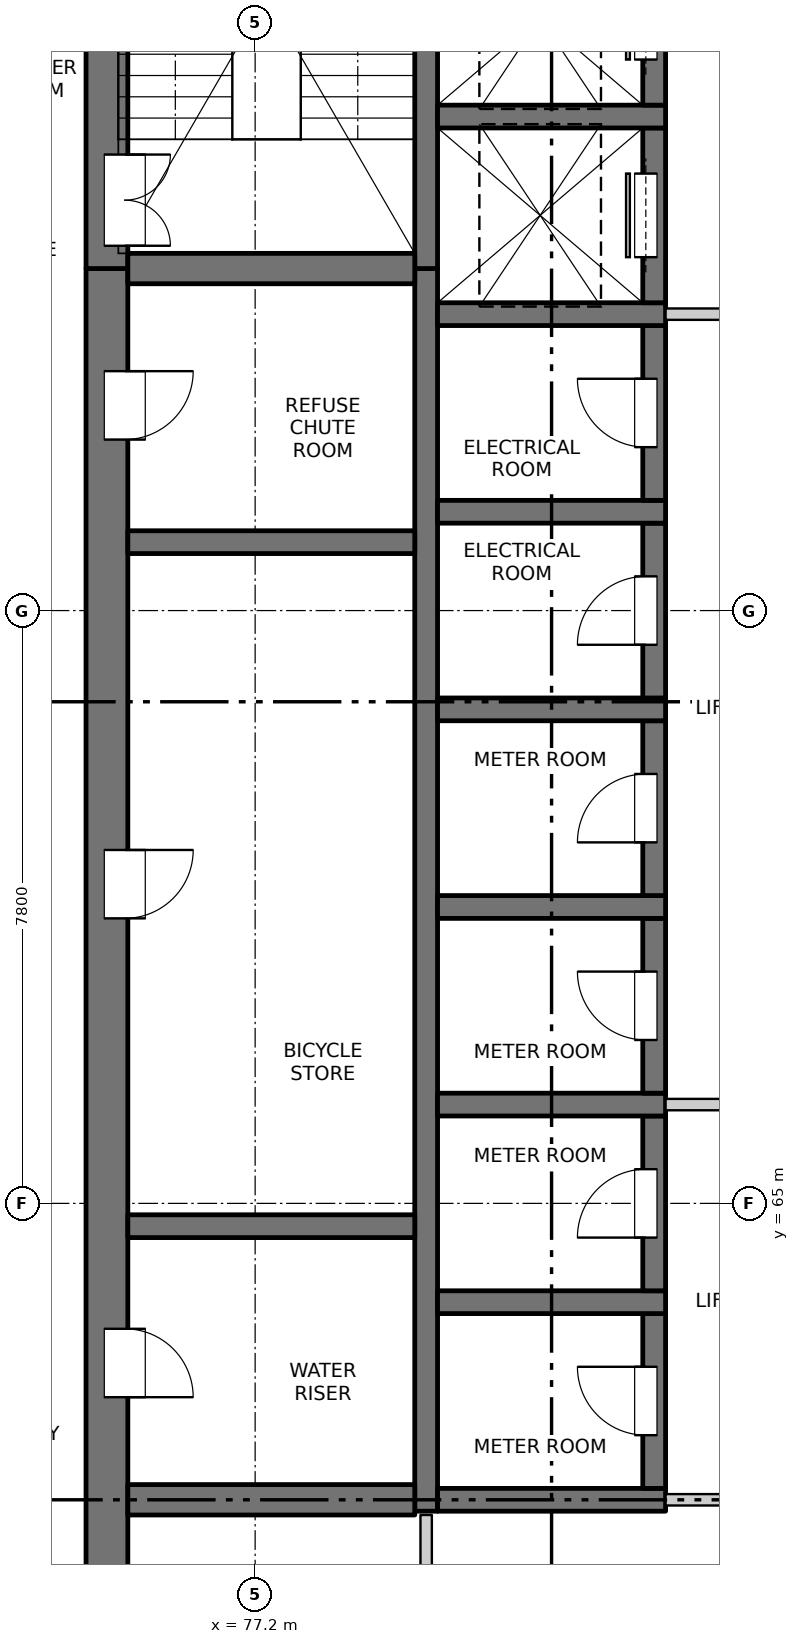
"""IFC4 building model, lengths in metres.
Left out: names, types, materials, properties, quantities, classifications, styles, units other than length and angle.
Written with IfcOpenShell. Run it as: python <this file> out.ifc"""

import sys

from ifc_helpers import new_model, si_unit, direction, frame, frame_2d, origin, place, context, subcontext, project, spatial, rectangle, extrude, element, fill, save


model = new_model("IFC4")
c1 = context("Model", 3, precision=1e-05, world=origin(), true_north=direction((0.0, 1.0)))
c2 = subcontext(c1, "Body", "Model", "MODEL_VIEW")
j1 = project(units=[si_unit("LENGTHUNIT", "METRE"), si_unit("PLANEANGLEUNIT", "RADIAN")], contexts=[c1])
p1 = place(None, origin())
s1 = spatial("IfcSite", under=j1, at=p1, CompositionType="ELEMENT")
p2 = place(p1, origin())
s2 = spatial("IfcBuilding", under=s1, at=p2, CompositionType="ELEMENT")
p3 = place(p2, frame((0.0, 0.0, 148.6)))
s3 = spatial("IfcBuildingStorey", under=s2, at=p3, CompositionType="ELEMENT", Elevation=148.6)
p4 = place(p3, frame((75.25, 54.975, -0.3), z_axis=(0.0, 0.0, 1.0), x_axis=(0.0, 1.0, 0.0)))
e1 = element("IfcWall", 1, at=p4, inside=s3, PredefinedType="SOLIDWALL", context=c2, shape_type="SweptSolid", body=[
    extrude(rectangle(XDim=22.325, YDim=0.55, at=frame_2d((11.163, 0.0))), origin(), (0.0, 0.0, 1.0), 3.45),
])
p5 = place(p4, frame((7.475, 0.0, 0.3)))
e2 = element("IfcOpeningElement", 2, at=p5, cuts=e1, PredefinedType="OPENING", context=c2, shape_type="SweptSolid", body=[
    extrude(rectangle(XDim=0.9, YDim=2.1, at=frame_2d((0.45, 1.05))), frame((0.0, 0.285, 0.0), z_axis=(0.0, -1.0, 0.0), x_axis=(1.0, 0.0, 0.0)), (0.0, 0.0, 1.0), 0.57),
])
p6 = place(p4, frame((13.775, 0.0, 0.3)))
e3 = element("IfcOpeningElement", 3, at=p6, cuts=e1, PredefinedType="OPENING", context=c2, shape_type="SweptSolid", body=[
    extrude(rectangle(XDim=0.9, YDim=2.1, at=frame_2d((0.45, 1.05))), frame((0.0, 0.285, 0.0), z_axis=(0.0, -1.0, 0.0), x_axis=(1.0, 0.0, 0.0)), (0.0, 0.0, 1.0), 0.57),
])
p7 = place(p4, frame((20.075, 0.0, 0.3)))
e4 = element("IfcOpeningElement", 4, at=p7, cuts=e1, PredefinedType="OPENING", context=c2, shape_type="SweptSolid", body=[
    extrude(rectangle(XDim=0.9, YDim=2.1, at=frame_2d((0.45, 1.05))), frame((0.0, 0.285, 0.0), z_axis=(0.0, -1.0, 0.0), x_axis=(1.0, 0.0, 0.0)), (0.0, 0.0, 1.0), 0.57),
])
p8 = place(p3, frame((75.25, 77.3, -0.3), z_axis=(0.0, 0.0, 1.0), x_axis=(0.0, 1.0, 0.0)))
e5 = element("IfcWall", 5, at=p8, inside=s3, PredefinedType="SOLIDWALL", context=c2, shape_type="SweptSolid", body=[
    extrude(rectangle(XDim=7.475, YDim=0.55, at=frame_2d((3.737, 0.0))), origin(), (0.0, 0.0, 1.0), 3.45),
])
p9 = place(p8, frame((0.3, 0.0, 0.3)))
e6 = element("IfcOpeningElement", 6, at=p9, cuts=e5, PredefinedType="OPENING", context=c2, shape_type="SweptSolid", body=[
    extrude(rectangle(XDim=1.2, YDim=2.1, at=frame_2d((0.6, 1.05))), frame((0.0, 0.285, 0.0), z_axis=(0.0, -1.0, 0.0), x_axis=(1.0, 0.0, 0.0)), (0.0, 0.0, 1.0), 0.57),
])
p10 = place(p3, frame((79.45, 60.95, -0.3), z_axis=(0.0, 0.0, 1.0), x_axis=(0.0, 1.0, 0.0)))
e7 = element("IfcWall", 7, at=p10, inside=s3, PredefinedType="SOLIDWALL", context=c2, shape_type="SweptSolid", body=[
    extrude(rectangle(XDim=16.35, YDim=0.3, at=frame_2d((8.175, 0.0))), origin(), (0.0, 0.0, 1.0), 3.45),
])
p11 = place(p3, frame((79.45, 77.3, -0.3), z_axis=(0.0, 0.0, 1.0), x_axis=(0.0, 1.0, 0.0)))
e8 = element("IfcWall", 8, at=p11, inside=s3, PredefinedType="SOLIDWALL", context=c2, shape_type="SweptSolid", body=[
    extrude(rectangle(XDim=6.925, YDim=0.3, at=frame_2d((3.462, 0.0))), origin(), (0.0, 0.0, 1.0), 3.45),
])
p12 = place(p3, frame((79.6, 61.1, -0.3), z_axis=(0.0, 0.0, 1.0), x_axis=(1.0, 0.0, 0.0)))
e9 = element("IfcWall", 9, at=p12, inside=s3, PredefinedType="SOLIDWALL", context=c2, shape_type="SweptSolid", body=[
    extrude(rectangle(XDim=3.0, YDim=0.3, at=frame_2d((1.5, 0.0))), origin(), (0.0, 0.0, 1.0), 3.45),
])
p13 = place(p3, frame((82.45, 61.25, -0.3), z_axis=(0.0, 0.0, 1.0), x_axis=(0.0, 1.0, 0.0)))
e10 = element("IfcWall", 10, at=p13, inside=s3, PredefinedType="SOLIDWALL", context=c2, shape_type="SweptSolid", body=[
    extrude(rectangle(XDim=2.3, YDim=0.3, at=frame_2d((1.15, 0.0))), origin(), (0.0, 0.0, 1.0), 3.45),
])
p14 = place(p13, frame((0.7, 0.0, 0.3)))
e11 = element("IfcOpeningElement", 11, at=p14, cuts=e10, PredefinedType="OPENING", context=c2, shape_type="SweptSolid", body=[
    extrude(rectangle(XDim=0.9, YDim=2.1, at=frame_2d((0.45, 1.05))), frame((0.0, 0.16, 0.0), z_axis=(0.0, -1.0, 0.0), x_axis=(1.0, 0.0, 0.0)), (0.0, 0.0, 1.0), 0.32),
])
p15 = place(p3, frame((79.6, 63.7, -0.3), z_axis=(0.0, 0.0, 1.0), x_axis=(1.0, 0.0, 0.0)))
e12 = element("IfcWall", 12, at=p15, inside=s3, PredefinedType="SOLIDWALL", context=c2, shape_type="SweptSolid", body=[
    extrude(rectangle(XDim=3.0, YDim=0.3, at=frame_2d((1.5, 0.0))), origin(), (0.0, 0.0, 1.0), 3.45),
])
p16 = place(p3, frame((82.45, 63.85, -0.3), z_axis=(0.0, 0.0, 1.0), x_axis=(0.0, 1.0, 0.0)))
e13 = element("IfcWall", 13, at=p16, inside=s3, PredefinedType="SOLIDWALL", context=c2, shape_type="SweptSolid", body=[
    extrude(rectangle(XDim=2.3, YDim=0.3, at=frame_2d((1.15, 0.0))), origin(), (0.0, 0.0, 1.0), 3.45),
])
p17 = place(p16, frame((0.7, 0.0, 0.3)))
e14 = element("IfcOpeningElement", 14, at=p17, cuts=e13, PredefinedType="OPENING", context=c2, shape_type="SweptSolid", body=[
    extrude(rectangle(XDim=0.9, YDim=2.1, at=frame_2d((0.45, 1.05))), frame((0.0, 0.16, 0.0), z_axis=(0.0, -1.0, 0.0), x_axis=(1.0, 0.0, 0.0)), (0.0, 0.0, 1.0), 0.32),
])
p18 = place(p3, frame((79.6, 66.3, -0.3), z_axis=(0.0, 0.0, 1.0), x_axis=(1.0, 0.0, 0.0)))
e15 = element("IfcWall", 15, at=p18, inside=s3, PredefinedType="SOLIDWALL", context=c2, shape_type="SweptSolid", body=[
    extrude(rectangle(XDim=3.0, YDim=0.3, at=frame_2d((1.5, 0.0))), origin(), (0.0, 0.0, 1.0), 3.45),
])
p19 = place(p3, frame((82.45, 66.45, -0.3), z_axis=(0.0, 0.0, 1.0), x_axis=(0.0, 1.0, 0.0)))
e16 = element("IfcWall", 16, at=p19, inside=s3, PredefinedType="SOLIDWALL", context=c2, shape_type="SweptSolid", body=[
    extrude(rectangle(XDim=2.3, YDim=0.3, at=frame_2d((1.15, 0.0))), origin(), (0.0, 0.0, 1.0), 3.45),
])
p20 = place(p19, frame((0.7, 0.0, 0.3)))
e17 = element("IfcOpeningElement", 17, at=p20, cuts=e16, PredefinedType="OPENING", context=c2, shape_type="SweptSolid", body=[
    extrude(rectangle(XDim=0.9, YDim=2.1, at=frame_2d((0.45, 1.05))), frame((0.0, 0.16, 0.0), z_axis=(0.0, -1.0, 0.0), x_axis=(1.0, 0.0, 0.0)), (0.0, 0.0, 1.0), 0.32),
])
p21 = place(p3, frame((79.6, 68.9, -0.3), z_axis=(0.0, 0.0, 1.0), x_axis=(1.0, 0.0, 0.0)))
e18 = element("IfcWall", 18, at=p21, inside=s3, PredefinedType="SOLIDWALL", context=c2, shape_type="SweptSolid", body=[
    extrude(rectangle(XDim=3.0, YDim=0.3, at=frame_2d((1.5, 0.0))), origin(), (0.0, 0.0, 1.0), 3.45),
])
p22 = place(p3, frame((82.45, 69.05, -0.3), z_axis=(0.0, 0.0, 1.0), x_axis=(0.0, 1.0, 0.0)))
e19 = element("IfcWall", 19, at=p22, inside=s3, PredefinedType="SOLIDWALL", context=c2, shape_type="SweptSolid", body=[
    extrude(rectangle(XDim=2.3, YDim=0.3, at=frame_2d((1.15, 0.0))), origin(), (0.0, 0.0, 1.0), 3.45),
])
p23 = place(p22, frame((0.7, 0.0, 0.3)))
e20 = element("IfcOpeningElement", 20, at=p23, cuts=e19, PredefinedType="OPENING", context=c2, shape_type="SweptSolid", body=[
    extrude(rectangle(XDim=0.9, YDim=2.1, at=frame_2d((0.45, 1.05))), frame((0.0, 0.16, 0.0), z_axis=(0.0, -1.0, 0.0), x_axis=(1.0, 0.0, 0.0)), (0.0, 0.0, 1.0), 0.32),
])
p24 = place(p3, frame((79.6, 71.5, -0.3), z_axis=(0.0, 0.0, 1.0), x_axis=(1.0, 0.0, 0.0)))
e21 = element("IfcWall", 21, at=p24, inside=s3, PredefinedType="SOLIDWALL", context=c2, shape_type="SweptSolid", body=[
    extrude(rectangle(XDim=3.0, YDim=0.3, at=frame_2d((1.5, 0.0))), origin(), (0.0, 0.0, 1.0), 3.45),
])
p25 = place(p3, frame((82.45, 71.65, -0.3), z_axis=(0.0, 0.0, 1.0), x_axis=(0.0, 1.0, 0.0)))
e22 = element("IfcWall", 22, at=p25, inside=s3, PredefinedType="SOLIDWALL", context=c2, shape_type="SweptSolid", body=[
    extrude(rectangle(XDim=2.3, YDim=0.3, at=frame_2d((1.15, 0.0))), origin(), (0.0, 0.0, 1.0), 3.45),
])
p26 = place(p25, frame((0.7, 0.0, 0.3)))
e23 = element("IfcOpeningElement", 23, at=p26, cuts=e22, PredefinedType="OPENING", context=c2, shape_type="SweptSolid", body=[
    extrude(rectangle(XDim=0.9, YDim=2.1, at=frame_2d((0.45, 1.05))), frame((0.0, 0.16, 0.0), z_axis=(0.0, -1.0, 0.0), x_axis=(1.0, 0.0, 0.0)), (0.0, 0.0, 1.0), 0.32),
])
p27 = place(p3, frame((79.6, 74.1, -0.3), z_axis=(0.0, 0.0, 1.0), x_axis=(1.0, 0.0, 0.0)))
e24 = element("IfcWall", 24, at=p27, inside=s3, PredefinedType="SOLIDWALL", context=c2, shape_type="SweptSolid", body=[
    extrude(rectangle(XDim=3.0, YDim=0.3, at=frame_2d((1.5, 0.0))), origin(), (0.0, 0.0, 1.0), 3.45),
])
p28 = place(p3, frame((82.45, 74.25, -0.3), z_axis=(0.0, 0.0, 1.0), x_axis=(0.0, 1.0, 0.0)))
e25 = element("IfcWall", 25, at=p28, inside=s3, PredefinedType="SOLIDWALL", context=c2, shape_type="SweptSolid", body=[
    extrude(rectangle(XDim=2.3, YDim=0.3, at=frame_2d((1.15, 0.0))), origin(), (0.0, 0.0, 1.0), 3.45),
])
p29 = place(p28, frame((0.7, 0.0, 0.3)))
e26 = element("IfcOpeningElement", 26, at=p29, cuts=e25, PredefinedType="OPENING", context=c2, shape_type="SweptSolid", body=[
    extrude(rectangle(XDim=0.9, YDim=2.1, at=frame_2d((0.45, 1.05))), frame((0.0, 0.16, 0.0), z_axis=(0.0, -1.0, 0.0), x_axis=(1.0, 0.0, 0.0)), (0.0, 0.0, 1.0), 0.32),
])
p30 = place(p3, frame((79.6, 76.7, -0.3), z_axis=(0.0, 0.0, 1.0), x_axis=(1.0, 0.0, 0.0)))
e27 = element("IfcWall", 27, at=p30, inside=s3, PredefinedType="SOLIDWALL", context=c2, shape_type="SweptSolid", body=[
    extrude(rectangle(XDim=3.0, YDim=0.3, at=frame_2d((1.5, 0.0))), origin(), (0.0, 0.0, 1.0), 3.45),
])
p31 = place(p3, frame((82.45, 76.85, -0.3), z_axis=(0.0, 0.0, 1.0), x_axis=(0.0, 1.0, 0.0)))
e28 = element("IfcWall", 28, at=p31, inside=s3, PredefinedType="SOLIDWALL", context=c2, shape_type="SweptSolid", body=[
    extrude(rectangle(XDim=2.3, YDim=0.3, at=frame_2d((1.15, 0.0))), origin(), (0.0, 0.0, 1.0), 3.45),
])
p32 = place(p31, frame((0.6, 0.0, 0.3)))
e29 = element("IfcOpeningElement", 29, at=p32, cuts=e28, PredefinedType="OPENING", context=c2, shape_type="SweptSolid", body=[
    extrude(rectangle(XDim=1.1, YDim=2.1, at=frame_2d((0.55, 1.05))), frame((0.0, 0.16, 0.0), z_axis=(0.0, -1.0, 0.0), x_axis=(1.0, 0.0, 0.0)), (0.0, 0.0, 1.0), 0.32),
])
p33 = place(p3, frame((79.6, 79.3, -0.3), z_axis=(0.0, 0.0, 1.0), x_axis=(1.0, 0.0, 0.0)))
e30 = element("IfcWall", 30, at=p33, inside=s3, PredefinedType="SOLIDWALL", context=c2, shape_type="SweptSolid", body=[
    extrude(rectangle(XDim=3.0, YDim=0.3, at=frame_2d((1.5, 0.0))), origin(), (0.0, 0.0, 1.0), 3.45),
])
p34 = place(p3, frame((82.45, 79.45, -0.3), z_axis=(0.0, 0.0, 1.0), x_axis=(0.0, 1.0, 0.0)))
e31 = element("IfcWall", 31, at=p34, inside=s3, PredefinedType="SOLIDWALL", context=c2, shape_type="SweptSolid", body=[
    extrude(rectangle(XDim=2.3, YDim=0.3, at=frame_2d((1.15, 0.0))), origin(), (0.0, 0.0, 1.0), 3.45),
])
p35 = place(p34, frame((0.6, 0.0, 0.3)))
e32 = element("IfcOpeningElement", 32, at=p35, cuts=e31, PredefinedType="OPENING", context=c2, shape_type="SweptSolid", body=[
    extrude(rectangle(XDim=1.1, YDim=2.1, at=frame_2d((0.55, 1.05))), frame((0.0, 0.16, 0.0), z_axis=(0.0, -1.0, 0.0), x_axis=(1.0, 0.0, 0.0)), (0.0, 0.0, 1.0), 0.32),
])
p36 = place(p3, frame((75.525, 61.1, -0.3), z_axis=(0.0, 0.0, 1.0), x_axis=(1.0, 0.0, 0.0)))
e33 = element("IfcWall", 33, at=p36, inside=s3, PredefinedType="SOLIDWALL", context=c2, shape_type="SweptSolid", body=[
    extrude(rectangle(XDim=3.775, YDim=0.4, at=frame_2d((1.888, 0.0))), origin(), (0.0, 0.0, 1.0), 3.45),
])
for number, where, z_axis, x_axis in (
    (34, (75.525, 64.7, -0.3), (0.0, 0.0, 1.0), (1.0, 0.0, 0.0)),
    (35, (75.525, 73.7, -0.3), (0.0, 0.0, 1.0), (1.0, 0.0, 0.0)),
):
    element("IfcWall", number, at=place(p3, frame(where, z_axis=z_axis, x_axis=x_axis)), inside=s3, PredefinedType="SOLIDWALL", context=c2, shape_type="SweptSolid", body=[
        extrude(rectangle(XDim=3.775, YDim=0.3, at=frame_2d((1.888, 0.0))), origin(), (0.0, 0.0, 1.0), 3.45),
    ])
p37 = place(p3, frame((75.525, 77.3, -0.3), z_axis=(0.0, 0.0, 1.0), x_axis=(1.0, 0.0, 0.0)))
e36 = element("IfcWall", 36, at=p37, inside=s3, PredefinedType="SOLIDWALL", context=c2, shape_type="SweptSolid", body=[
    extrude(rectangle(XDim=3.775, YDim=0.4, at=frame_2d((1.888, 0.0))), origin(), (0.0, 0.0, 1.0), 3.45),
])
p38 = place(p3, frame((82.6, 61.1, 0.0), z_axis=(0.0, 0.0, 1.0), x_axis=(1.0, 0.0, 0.0)))
e37 = element("IfcWall", 37, at=p38, inside=s3, PredefinedType="PARTITIONING", context=c2, shape_type="SweptSolid", body=[
    extrude(rectangle(XDim=4.8, YDim=0.15, at=frame_2d((2.4, 0.0))), origin(), (0.0, 0.0, 1.0), 3.15),
])
p39 = place(p38, frame((1.5, 0.0, 0.0)))
e38 = element("IfcOpeningElement", 38, at=p39, cuts=e37, PredefinedType="OPENING", context=c2, shape_type="SweptSolid", body=[
    extrude(rectangle(XDim=1.8, YDim=2.1, at=frame_2d((0.9, 1.05))), frame((0.0, 0.085, 0.0), z_axis=(0.0, -1.0, 0.0), x_axis=(1.0, 0.0, 0.0)), (0.0, 0.0, 1.0), 0.17),
])
p40 = place(p3, frame((82.6, 66.3, 0.0), z_axis=(0.0, 0.0, 1.0), x_axis=(1.0, 0.0, 0.0)))
e39 = element("IfcWall", 39, at=p40, inside=s3, PredefinedType="PARTITIONING", context=c2, shape_type="SweptSolid", body=[
    extrude(rectangle(XDim=4.8, YDim=0.15, at=frame_2d((2.4, 0.0))), origin(), (0.0, 0.0, 1.0), 3.15),
])
p41 = place(p40, frame((1.5, 0.0, 0.0)))
e40 = element("IfcOpeningElement", 40, at=p41, cuts=e39, PredefinedType="OPENING", context=c2, shape_type="SweptSolid", body=[
    extrude(rectangle(XDim=1.8, YDim=2.1, at=frame_2d((0.9, 1.05))), frame((0.0, 0.085, 0.0), z_axis=(0.0, -1.0, 0.0), x_axis=(1.0, 0.0, 0.0)), (0.0, 0.0, 1.0), 0.17),
])
p42 = place(p3, frame((82.6, 76.7, 0.0), z_axis=(0.0, 0.0, 1.0), x_axis=(1.0, 0.0, 0.0)))
e41 = element("IfcWall", 41, at=p42, inside=s3, PredefinedType="PARTITIONING", context=c2, shape_type="SweptSolid", body=[
    extrude(rectangle(XDim=4.8, YDim=0.15, at=frame_2d((2.4, 0.0))), origin(), (0.0, 0.0, 1.0), 3.15),
])
p43 = place(p42, frame((1.5, 0.0, 0.0)))
e42 = element("IfcOpeningElement", 42, at=p43, cuts=e41, PredefinedType="OPENING", context=c2, shape_type="SweptSolid", body=[
    extrude(rectangle(XDim=1.8, YDim=2.1, at=frame_2d((0.9, 1.05))), frame((0.0, 0.085, 0.0), z_axis=(0.0, -1.0, 0.0), x_axis=(1.0, 0.0, 0.0)), (0.0, 0.0, 1.0), 0.17),
])
p44 = place(p3, frame((79.45, 55.525, 0.0), z_axis=(0.0, 0.0, 1.0), x_axis=(0.0, 1.0, 0.0)))
e43 = element("IfcWall", 43, at=p44, inside=s3, PredefinedType="PARTITIONING", context=c2, shape_type="SweptSolid", body=[
    extrude(rectangle(XDim=5.375, YDim=0.15, at=frame_2d((2.688, 0.0))), origin(), (0.0, 0.0, 1.0), 3.15),
])
p45 = place(p44, frame((2.175, 0.0, 0.0)))
e44 = element("IfcOpeningElement", 44, at=p45, cuts=e43, PredefinedType="OPENING", context=c2, shape_type="SweptSolid", body=[
    extrude(rectangle(XDim=0.9, YDim=2.1, at=frame_2d((0.45, 1.05))), frame((0.0, 0.085, 0.0), z_axis=(0.0, -1.0, 0.0), x_axis=(1.0, 0.0, 0.0)), (0.0, 0.0, 1.0), 0.17),
])
p46 = place(p14, origin())
e45 = element("IfcDoor", 45, at=p46, inside=s3, OperationType="SINGLE_SWING_RIGHT", PredefinedType="DOOR", context=c2, shape_type="SweptSolid", body=[
    extrude(rectangle(XDim=0.9, YDim=2.1, at=frame_2d((0.45, 1.05))), frame((0.0, 0.135, 0.0), z_axis=(0.0, -1.0, 0.0), x_axis=(1.0, 0.0, 0.0)), (0.0, 0.0, 1.0), 0.05),
])
fill(e11, e45)
p47 = place(p5, origin())
e46 = element("IfcDoor", 46, at=p47, inside=s3, OperationType="SINGLE_SWING_RIGHT", PredefinedType="DOOR", context=c2, shape_type="SweptSolid", body=[
    extrude(rectangle(XDim=0.9, YDim=2.1, at=frame_2d((0.45, 1.05))), frame((0.0, -0.21, 0.0), z_axis=(0.0, -1.0, 0.0), x_axis=(1.0, 0.0, 0.0)), (0.0, 0.0, 1.0), 0.05),
])
fill(e2, e46)
p48 = place(p17, origin())
e47 = element("IfcDoor", 47, at=p48, inside=s3, OperationType="SINGLE_SWING_LEFT", PredefinedType="DOOR", context=c2, shape_type="SweptSolid", body=[
    extrude(rectangle(XDim=0.9, YDim=2.1, at=frame_2d((0.45, 1.05))), frame((0.0, 0.135, 0.0), z_axis=(0.0, -1.0, 0.0), x_axis=(1.0, 0.0, 0.0)), (0.0, 0.0, 1.0), 0.05),
])
fill(e14, e47)
p49 = place(p20, origin())
e48 = element("IfcDoor", 48, at=p49, inside=s3, OperationType="SINGLE_SWING_RIGHT", PredefinedType="DOOR", context=c2, shape_type="SweptSolid", body=[
    extrude(rectangle(XDim=0.9, YDim=2.1, at=frame_2d((0.45, 1.05))), frame((0.0, 0.135, 0.0), z_axis=(0.0, -1.0, 0.0), x_axis=(1.0, 0.0, 0.0)), (0.0, 0.0, 1.0), 0.05),
])
fill(e17, e48)
p50 = place(p6, origin())
e49 = element("IfcDoor", 49, at=p50, inside=s3, OperationType="SINGLE_SWING_LEFT", PredefinedType="DOOR", context=c2, shape_type="SweptSolid", body=[
    extrude(rectangle(XDim=0.9, YDim=2.1, at=frame_2d((0.45, 1.05))), frame((0.0, -0.21, 0.0), z_axis=(0.0, -1.0, 0.0), x_axis=(1.0, 0.0, 0.0)), (0.0, 0.0, 1.0), 0.05),
])
fill(e3, e49)
p51 = place(p23, origin())
e50 = element("IfcDoor", 50, at=p51, inside=s3, OperationType="SINGLE_SWING_LEFT", PredefinedType="DOOR", context=c2, shape_type="SweptSolid", body=[
    extrude(rectangle(XDim=0.9, YDim=2.1, at=frame_2d((0.45, 1.05))), frame((0.0, 0.135, 0.0), z_axis=(0.0, -1.0, 0.0), x_axis=(1.0, 0.0, 0.0)), (0.0, 0.0, 1.0), 0.05),
])
fill(e20, e50)
p52 = place(p26, origin())
e51 = element("IfcDoor", 51, at=p52, inside=s3, OperationType="SINGLE_SWING_LEFT", PredefinedType="DOOR", context=c2, shape_type="SweptSolid", body=[
    extrude(rectangle(XDim=0.9, YDim=2.1, at=frame_2d((0.45, 1.05))), frame((0.0, 0.135, 0.0), z_axis=(0.0, -1.0, 0.0), x_axis=(1.0, 0.0, 0.0)), (0.0, 0.0, 1.0), 0.05),
])
fill(e23, e51)
p53 = place(p29, origin())
e52 = element("IfcDoor", 52, at=p53, inside=s3, OperationType="SINGLE_SWING_RIGHT", PredefinedType="DOOR", context=c2, shape_type="SweptSolid", body=[
    extrude(rectangle(XDim=0.9, YDim=2.1, at=frame_2d((0.45, 1.05))), frame((0.0, 0.135, 0.0), z_axis=(0.0, -1.0, 0.0), x_axis=(1.0, 0.0, 0.0)), (0.0, 0.0, 1.0), 0.05),
])
fill(e26, e52)
p54 = place(p7, origin())
e53 = element("IfcDoor", 53, at=p54, inside=s3, OperationType="SINGLE_SWING_LEFT", PredefinedType="DOOR", context=c2, shape_type="SweptSolid", body=[
    extrude(rectangle(XDim=0.9, YDim=2.1, at=frame_2d((0.45, 1.05))), frame((0.0, -0.21, 0.0), z_axis=(0.0, -1.0, 0.0), x_axis=(1.0, 0.0, 0.0)), (0.0, 0.0, 1.0), 0.05),
])
fill(e4, e53)
p55 = place(p32, origin())
e54 = element("IfcDoor", 54, at=p55, inside=s3, OperationType="SLIDING_TO_LEFT", PredefinedType="DOOR", context=c2, shape_type="SweptSolid", body=[
    extrude(rectangle(XDim=1.1, YDim=2.1, at=frame_2d((0.55, 1.05))), frame((0.0, 0.135, 0.0), z_axis=(0.0, -1.0, 0.0), x_axis=(1.0, 0.0, 0.0)), (0.0, 0.0, 1.0), 0.05),
])
fill(e29, e54)
p56 = place(p9, origin())
e55 = element("IfcDoor", 55, at=p56, inside=s3, OperationType="DOUBLE_DOOR_SINGLE_SWING", PredefinedType="DOOR", context=c2, shape_type="SweptSolid", body=[
    extrude(rectangle(XDim=1.2, YDim=2.1, at=frame_2d((0.6, 1.05))), frame((0.0, -0.21, 0.0), z_axis=(0.0, -1.0, 0.0), x_axis=(1.0, 0.0, 0.0)), (0.0, 0.0, 1.0), 0.05),
])
fill(e6, e55)
p57 = place(p35, origin())
e56 = element("IfcDoor", 56, at=p57, inside=s3, OperationType="SLIDING_TO_LEFT", PredefinedType="DOOR", context=c2, shape_type="SweptSolid", body=[
    extrude(rectangle(XDim=1.1, YDim=2.1, at=frame_2d((0.55, 1.05))), frame((0.0, 0.135, 0.0), z_axis=(0.0, -1.0, 0.0), x_axis=(1.0, 0.0, 0.0)), (0.0, 0.0, 1.0), 0.05),
])
fill(e32, e56)
save(model, sys.argv[1])
